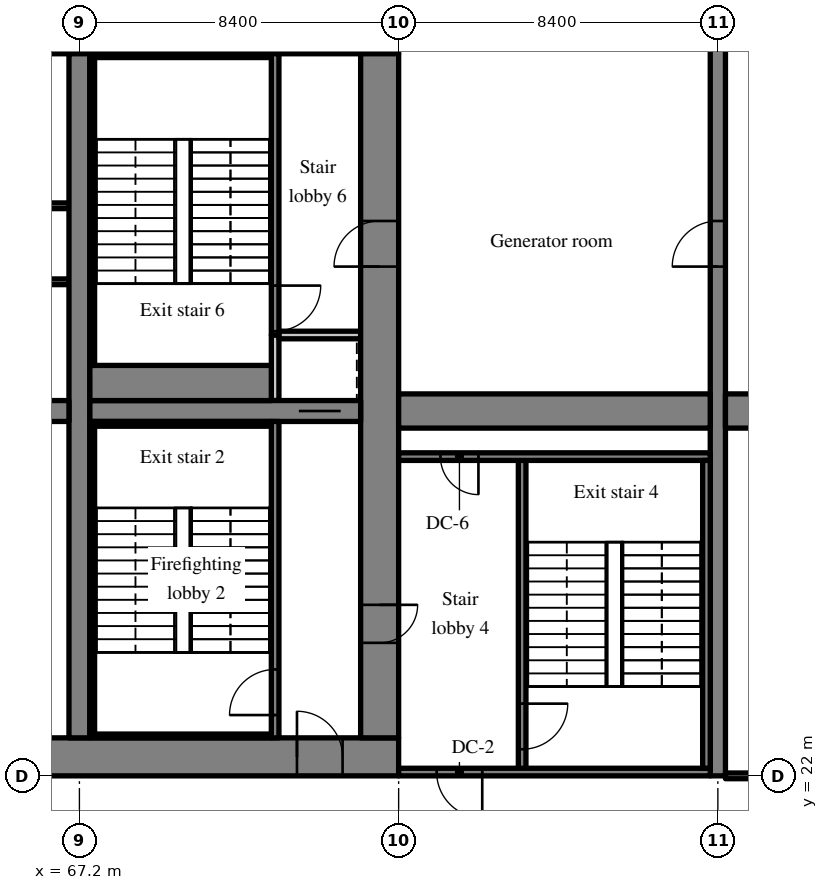
"""IFC4 building model, lengths in metres.
Left out: names, types, materials, properties, quantities, classifications, styles, units other than length and angle.
Written with IfcOpenShell. Run it as: python <this file> out.ifc"""

import sys

from ifc_helpers import new_model, si_unit, direction, frame, frame_2d, origin, place, context, subcontext, project, spatial, rectangle, extrude, source, transform, mapped, element, fill, save


model = new_model("IFC4")
c1 = context("Model", 3, precision=1e-05, world=origin(), true_north=direction((0.0, 1.0)))
c2 = subcontext(c1, "Body", "Model", "MODEL_VIEW")
j1 = project(units=[si_unit("LENGTHUNIT", "METRE"), si_unit("PLANEANGLEUNIT", "RADIAN")], contexts=[c1])
p1 = place(None, origin())
s1 = spatial("IfcSite", under=j1, at=p1, CompositionType="ELEMENT")
p2 = place(p1, origin())
s2 = spatial("IfcBuilding", under=s1, at=p2, CompositionType="ELEMENT")
p3 = place(p2, frame((0.0, 0.0, 81.0)))
s3 = spatial("IfcBuildingStorey", under=s2, at=p3, CompositionType="ELEMENT", Elevation=81.0)
m1 = source(origin(), c2, "Body", "SweptSolid", [
    extrude(rectangle(XDim=50.4, YDim=1.0, at=frame_2d((25.2, 0.0))), origin(), (0.0, 0.0, 1.0), 5.12),
])
p4 = place(p3, frame((25.2, 22.5, 0.0), z_axis=(0.0, 0.0, 1.0), x_axis=(1.0, 0.0, 0.0)))
e1 = element("IfcWall", 1, at=p4, inside=s3, PredefinedType="SHEAR", context=c2, shape_type="MappedRepresentation", body=[
    mapped(m1, transform((0.0, 0.0, 0.0), scale=1.0)),
])
m2 = source(origin(), c2, "Body", "SweptSolid", [
    extrude(rectangle(XDim=1.8, YDim=2.1, at=frame_2d((0.9, 1.05))), frame((0.0, 0.51, 0.0), z_axis=(0.0, -1.0, 0.0), x_axis=(1.0, 0.0, 0.0)), (0.0, 0.0, 1.0), 1.02),
])
p5 = place(p4, frame((15.9, 0.0, 0.0)))
e2 = element("IfcOpeningElement", 2, at=p5, cuts=e1, PredefinedType="OPENING", context=c2, shape_type="MappedRepresentation", body=[
    mapped(m2, transform((0.0, 0.0, 0.0), scale=1.0)),
])
m3 = source(origin(), c2, "Body", "SweptSolid", [
    extrude(rectangle(XDim=1.2, YDim=2.1, at=frame_2d((0.6, 1.05))), frame((0.0, 0.51, 0.0), z_axis=(0.0, -1.0, 0.0), x_axis=(1.0, 0.0, 0.0)), (0.0, 0.0, 1.0), 1.02),
])
p6 = place(p4, frame((26.987, 0.0, 0.0)))
e3 = element("IfcOpeningElement", 3, at=p6, cuts=e1, PredefinedType="OPENING", context=c2, shape_type="MappedRepresentation", body=[
    mapped(m3, transform((0.0, 0.0, 0.0), scale=1.0)),
])
m4 = source(origin(), c2, "Body", "SweptSolid", [
    extrude(rectangle(XDim=0.9, YDim=2.1, at=frame_2d((0.45, 1.05))), frame((0.0, 0.51, 0.0), z_axis=(0.0, -1.0, 0.0), x_axis=(1.0, 0.0, 0.0)), (0.0, 0.0, 1.0), 1.02),
])
p7 = place(p4, frame((33.75, 0.0, 0.0)))
e4 = element("IfcOpeningElement", 4, at=p7, cuts=e1, PredefinedType="OPENING", context=c2, shape_type="MappedRepresentation", body=[
    mapped(m4, transform((0.0, 0.0, 0.0), scale=1.0)),
])
p8 = place(p4, frame((30.75, 0.0, 0.0)))
e5 = element("IfcOpeningElement", 5, at=p8, cuts=e1, PredefinedType="OPENING", context=c2, shape_type="MappedRepresentation", body=[
    mapped(m4, transform((0.0, 0.0, 0.0), scale=1.0)),
])
p9 = place(p4, frame((38.262, 0.0, 0.0)))
e6 = element("IfcOpeningElement", 6, at=p9, cuts=e1, PredefinedType="OPENING", context=c2, shape_type="MappedRepresentation", body=[
    mapped(m4, transform((0.0, 0.0, 0.0), scale=1.0)),
])
p10 = place(p4, frame((6.438, 0.0, 0.0)))
e7 = element("IfcOpeningElement", 7, at=p10, cuts=e1, PredefinedType="OPENING", context=c2, shape_type="MappedRepresentation", body=[
    mapped(m3, transform((0.0, 0.0, 0.0), scale=1.0)),
])
p11 = place(p4, frame((47.725, 0.0, 0.0)))
e8 = element("IfcOpeningElement", 8, at=p11, cuts=e1, PredefinedType="OPENING", context=c2, shape_type="MappedRepresentation", body=[
    mapped(m3, transform((0.0, 0.0, 0.0), scale=1.0)),
])
p12 = place(p3, frame((25.2, 41.5, 0.0), z_axis=(0.0, 0.0, 1.0), x_axis=(1.0, 0.0, 0.0)))
e9 = element("IfcWall", 9, at=p12, inside=s3, PredefinedType="SHEAR", context=c2, shape_type="MappedRepresentation", body=[
    mapped(m1, transform((0.0, 0.0, 0.0), scale=1.0)),
])
m5 = source(origin(), c2, "Body", "SweptSolid", [
    extrude(rectangle(XDim=18.0, YDim=1.0, at=frame_2d((9.0, 0.0))), origin(), (0.0, 0.0, 1.0), 5.12),
])
p13 = place(p3, frame((75.1, 23.0, 0.0), z_axis=(0.0, 0.0, 1.0), x_axis=(0.0, 1.0, 0.0)))
e10 = element("IfcWall", 10, at=p13, inside=s3, PredefinedType="SHEAR", context=c2, shape_type="MappedRepresentation", body=[
    mapped(m5, transform((0.0, 0.0, 0.0), scale=1.0)),
])
m6 = source(origin(), c2, "Body", "SweptSolid", [
    extrude(rectangle(XDim=1.0, YDim=2.1, at=frame_2d((0.5, 1.05))), frame((0.0, 0.51, 0.0), z_axis=(0.0, -1.0, 0.0), x_axis=(1.0, 0.0, 0.0)), (0.0, 0.0, 1.0), 1.02),
])
p14 = place(p13, frame((2.5, 0.0, 0.0)))
e11 = element("IfcOpeningElement", 11, at=p14, cuts=e10, PredefinedType="OPENING", context=c2, shape_type="MappedRepresentation", body=[
    mapped(m6, transform((0.0, 0.0, 0.0), scale=1.0)),
])
p15 = place(p13, frame((12.4, 0.0, 0.0)))
e12 = element("IfcOpeningElement", 12, at=p15, cuts=e10, PredefinedType="OPENING", context=c2, shape_type="MappedRepresentation", body=[
    mapped(m3, transform((0.0, 0.0, 0.0), scale=1.0)),
])
m7 = source(origin(), c2, "Body", "SweptSolid", [
    extrude(rectangle(XDim=18.0, YDim=0.55, at=frame_2d((9.0, 0.0))), origin(), (0.0, 0.0, 1.0), 5.12),
])
p16 = place(p3, frame((67.2, 23.0, 0.0), z_axis=(0.0, 0.0, 1.0), x_axis=(0.0, 1.0, 0.0)))
e13 = element("IfcWall", 13, at=p16, inside=s3, PredefinedType="SHEAR", context=c2, shape_type="MappedRepresentation", body=[
    mapped(m7, transform((0.0, 0.0, 0.0), scale=1.0)),
])
m8 = source(origin(), c2, "Body", "SweptSolid", [
    extrude(rectangle(XDim=16.25, YDim=0.55, at=frame_2d((8.125, 0.0))), origin(), (0.0, 0.0, 1.0), 5.12),
])
p17 = place(p3, frame((50.675, 31.6, 0.0), z_axis=(0.0, 0.0, 1.0), x_axis=(1.0, 0.0, 0.0)))
e14 = element("IfcWall", 14, at=p17, inside=s3, PredefinedType="SHEAR", context=c2, shape_type="MappedRepresentation", body=[
    mapped(m8, transform((0.0, 0.0, 0.0), scale=1.0)),
])
m9 = source(origin(), c2, "Body", "SweptSolid", [
    extrude(rectangle(XDim=1.0, YDim=2.1, at=frame_2d((0.5, 1.05))), frame((0.0, 0.285, 0.0), z_axis=(0.0, -1.0, 0.0), x_axis=(1.0, 0.0, 0.0)), (0.0, 0.0, 1.0), 0.57),
])
p18 = place(p17, frame((0.562, 0.0, 0.0)))
e15 = element("IfcOpeningElement", 15, at=p18, cuts=e14, PredefinedType="OPENING", context=c2, shape_type="MappedRepresentation", body=[
    mapped(m9, transform((0.0, 0.0, 0.0), scale=1.0)),
])
m10 = source(origin(), c2, "Body", "SweptSolid", [
    extrude(rectangle(XDim=7.125, YDim=0.55, at=frame_2d((3.562, 0.0))), origin(), (0.0, 0.0, 1.0), 5.12),
])
p19 = place(p3, frame((67.475, 31.6, 0.0), z_axis=(0.0, 0.0, 1.0), x_axis=(1.0, 0.0, 0.0)))
e16 = element("IfcWall", 16, at=p19, inside=s3, PredefinedType="SHEAR", context=c2, shape_type="MappedRepresentation", body=[
    mapped(m10, transform((0.0, 0.0, 0.0), scale=1.0)),
])
m11 = source(origin(), c2, "Body", "SweptSolid", [
    extrude(rectangle(XDim=1.1, YDim=2.1, at=frame_2d((0.55, 1.05))), frame((0.0, 0.285, 0.0), z_axis=(0.0, -1.0, 0.0), x_axis=(1.0, 0.0, 0.0)), (0.0, 0.0, 1.0), 0.57),
])
p20 = place(p19, frame((5.5, 0.0, 0.0)))
e17 = element("IfcOpeningElement", 17, at=p20, cuts=e16, PredefinedType="OPENING", context=c2, shape_type="MappedRepresentation", body=[
    mapped(m11, transform((0.0, 0.0, 0.0), scale=1.0)),
])
m12 = source(origin(), c2, "Body", "SweptSolid", [
    extrude(rectangle(XDim=20.0, YDim=0.4, at=frame_2d((10.0, 0.0))), origin(), (0.0, 0.0, 1.0), 5.12),
])
p21 = place(p3, frame((84.0, 22.0, 0.0), z_axis=(0.0, 0.0, 1.0), x_axis=(0.0, 1.0, 0.0)))
e18 = element("IfcWall", 18, at=p21, inside=s3, PredefinedType="SHEAR", context=c2, shape_type="MappedRepresentation", body=[
    mapped(m12, transform((0.0, 0.0, 0.0), scale=1.0)),
])
m13 = source(origin(), c2, "Body", "SweptSolid", [
    extrude(rectangle(XDim=1.2, YDim=2.1, at=frame_2d((0.6, 1.05))), frame((0.0, 0.21, 0.0), z_axis=(0.0, -1.0, 0.0), x_axis=(1.0, 0.0, 0.0)), (0.0, 0.0, 1.0), 0.42),
])
p22 = place(p21, frame((13.4, 0.0, 0.0)))
e19 = element("IfcOpeningElement", 19, at=p22, cuts=e18, PredefinedType="OPENING", context=c2, shape_type="MappedRepresentation", body=[
    mapped(m13, transform((0.0, 0.0, 0.0), scale=1.0)),
])
m14 = source(origin(), c2, "Body", "SweptSolid", [
    extrude(rectangle(XDim=8.2, YDim=0.9, at=frame_2d((4.1, 0.0))), origin(), (0.0, 0.0, 1.0), 5.12),
])
p23 = place(p3, frame((75.6, 31.6, 0.0), z_axis=(0.0, 0.0, 1.0), x_axis=(1.0, 0.0, 0.0)))
e20 = element("IfcWall", 20, at=p23, inside=s3, PredefinedType="SHEAR", context=c2, shape_type="MappedRepresentation", body=[
    mapped(m14, transform((0.0, 0.0, 0.0), scale=1.0)),
])
m15 = source(origin(), c2, "Body", "SweptSolid", [
    extrude(rectangle(XDim=8.0, YDim=0.9, at=frame_2d((4.0, 0.0))), origin(), (0.0, 0.0, 1.0), 5.12),
])
p24 = place(p3, frame((84.2, 31.6, 0.0), z_axis=(0.0, 0.0, 1.0), x_axis=(1.0, 0.0, 0.0)))
e21 = element("IfcWall", 21, at=p24, inside=s3, PredefinedType="SHEAR", context=c2, shape_type="MappedRepresentation", body=[
    mapped(m15, transform((0.0, 0.0, 0.0), scale=1.0)),
])
m16 = source(origin(), c2, "Body", "SweptSolid", [
    extrude(rectangle(XDim=14.125, YDim=0.15, at=frame_2d((7.062, 0.0))), origin(), (0.0, 0.0, 1.0), 5.12),
])
p25 = place(p3, frame((66.925, 35.0, 0.0), z_axis=(0.0, 0.0, 1.0), x_axis=(-1.0, 0.0, 0.0)))
e22 = element("IfcWall", 22, at=p25, inside=s3, PredefinedType="PARTITIONING", context=c2, shape_type="MappedRepresentation", body=[
    mapped(m16, transform((0.0, 0.0, 0.0), scale=1.0)),
])
m17 = source(origin(), c2, "Body", "SweptSolid", [
    extrude(rectangle(XDim=0.9, YDim=2.1, at=frame_2d((0.45, 1.05))), frame((0.0, 0.085, 0.0), z_axis=(0.0, -1.0, 0.0), x_axis=(1.0, 0.0, 0.0)), (0.0, 0.0, 1.0), 0.17),
])
p26 = place(p25, frame((3.414, 0.0, 0.0)))
e23 = element("IfcOpeningElement", 23, at=p26, cuts=e22, PredefinedType="OPENING", context=c2, shape_type="MappedRepresentation", body=[
    mapped(m17, transform((0.0, 0.0, 0.0), scale=1.0)),
])
p27 = place(p25, frame((10.439, 0.0, 0.0)))
e24 = element("IfcOpeningElement", 24, at=p27, cuts=e22, PredefinedType="OPENING", context=c2, shape_type="MappedRepresentation", body=[
    mapped(m17, transform((0.0, 0.0, 0.0), scale=1.0)),
])
m18 = source(origin(), c2, "Body", "SweptSolid", [
    extrude(rectangle(XDim=16.25, YDim=0.15, at=frame_2d((8.125, 0.0))), origin(), (0.0, 0.0, 1.0), 5.12),
])
p28 = place(p3, frame((66.925, 37.0, 0.0), z_axis=(0.0, 0.0, 1.0), x_axis=(-1.0, 0.0, 0.0)))
e25 = element("IfcWall", 25, at=p28, inside=s3, PredefinedType="PARTITIONING", context=c2, shape_type="MappedRepresentation", body=[
    mapped(m18, transform((0.0, 0.0, 0.0), scale=1.0)),
])
p29 = place(p28, frame((6.456, 0.0, 0.0)))
e26 = element("IfcOpeningElement", 26, at=p29, cuts=e25, PredefinedType="OPENING", context=c2, shape_type="MappedRepresentation", body=[
    mapped(m17, transform((0.0, 0.0, 0.0), scale=1.0)),
])
p30 = place(p28, frame((14.581, 0.0, 0.0)))
e27 = element("IfcOpeningElement", 27, at=p30, cuts=e25, PredefinedType="OPENING", context=c2, shape_type="MappedRepresentation", body=[
    mapped(m17, transform((0.0, 0.0, 0.0), scale=1.0)),
])
m19 = source(origin(), c2, "Body", "SweptSolid", [
    extrude(rectangle(XDim=8.325, YDim=0.2, at=frame_2d((4.163, 0.0))), origin(), (0.0, 0.0, 1.0), 5.12),
])
p31 = place(p3, frame((72.35, 23.0, 0.0), z_axis=(0.0, 0.0, 1.0), x_axis=(0.0, 1.0, 0.0)))
e28 = element("IfcWall", 28, at=p31, inside=s3, PredefinedType="SOLIDWALL", context=c2, shape_type="MappedRepresentation", body=[
    mapped(m19, transform((0.0, 0.0, 0.0), scale=1.0)),
])
m20 = source(origin(), c2, "Body", "SweptSolid", [
    extrude(rectangle(XDim=1.2, YDim=2.1, at=frame_2d((0.6, 1.05))), frame((0.0, 0.11, 0.0), z_axis=(0.0, -1.0, 0.0), x_axis=(1.0, 0.0, 0.0)), (0.0, 0.0, 1.0), 0.22),
])
p32 = place(p31, frame((0.6, 0.0, 0.0)))
e29 = element("IfcOpeningElement", 29, at=p32, cuts=e28, PredefinedType="OPENING", context=c2, shape_type="MappedRepresentation", body=[
    mapped(m20, transform((0.0, 0.0, 0.0), scale=1.0)),
])
m21 = source(origin(), c2, "Body", "SweptSolid", [
    extrude(rectangle(XDim=1.725, YDim=0.2, at=frame_2d((0.863, 0.0))), origin(), (0.0, 0.0, 1.0), 5.12),
])
p33 = place(p3, frame((72.35, 31.875, 0.0), z_axis=(0.0, 0.0, 1.0), x_axis=(0.0, 1.0, 0.0)))
e30 = element("IfcWall", 30, at=p33, inside=s3, PredefinedType="SOLIDWALL", context=c2, shape_type="MappedRepresentation", body=[
    mapped(m21, transform((0.0, 0.0, 0.0), scale=1.0)),
])
m22 = source(origin(), c2, "Body", "SweptSolid", [
    extrude(rectangle(XDim=2.15, YDim=0.2, at=frame_2d((1.075, 0.0))), origin(), (0.0, 0.0, 1.0), 5.12),
])
p34 = place(p3, frame((72.45, 33.6, 0.0), z_axis=(0.0, 0.0, 1.0), x_axis=(1.0, 0.0, 0.0)))
e31 = element("IfcWall", 31, at=p34, inside=s3, PredefinedType="SOLIDWALL", context=c2, shape_type="MappedRepresentation", body=[
    mapped(m22, transform((0.0, 0.0, 0.0), scale=1.0)),
])
m23 = source(origin(), c2, "Body", "SweptSolid", [
    extrude(rectangle(XDim=7.4, YDim=0.2, at=frame_2d((3.7, 0.0))), origin(), (0.0, 0.0, 1.0), 5.12),
])
p35 = place(p3, frame((72.35, 33.6, 0.0), z_axis=(0.0, 0.0, 1.0), x_axis=(0.0, 1.0, 0.0)))
e32 = element("IfcWall", 32, at=p35, inside=s3, PredefinedType="SOLIDWALL", context=c2, shape_type="MappedRepresentation", body=[
    mapped(m23, transform((0.0, 0.0, 0.0), scale=1.0)),
])
p36 = place(p35, frame((0.1, 0.0, 0.0)))
e33 = element("IfcOpeningElement", 33, at=p36, cuts=e32, PredefinedType="OPENING", context=c2, shape_type="MappedRepresentation", body=[
    mapped(m20, transform((0.0, 0.0, 0.0), scale=1.0)),
])
m24 = source(origin(), c2, "Body", "SweptSolid", [
    extrude(rectangle(XDim=8.3, YDim=0.2, at=frame_2d((4.15, 0.0))), origin(), (0.0, 0.0, 1.0), 5.12),
])
p37 = place(p3, frame((78.85, 22.1, 0.0), z_axis=(0.0, 0.0, 1.0), x_axis=(0.0, 1.0, 0.0)))
e34 = element("IfcWall", 34, at=p37, inside=s3, PredefinedType="SOLIDWALL", context=c2, shape_type="MappedRepresentation", body=[
    mapped(m24, transform((0.0, 0.0, 0.0), scale=1.0)),
])
p38 = place(p37, frame((0.6, 0.0, 0.0)))
e35 = element("IfcOpeningElement", 35, at=p38, cuts=e34, PredefinedType="OPENING", context=c2, shape_type="MappedRepresentation", body=[
    mapped(m20, transform((0.0, 0.0, 0.0), scale=1.0)),
])
m25 = source(origin(), c2, "Body", "SweptSolid", [
    extrude(rectangle(XDim=8.2, YDim=0.2, at=frame_2d((4.1, 0.0))), origin(), (0.0, 0.0, 1.0), 5.12),
])
p39 = place(p3, frame((83.8, 22.1, 0.0), z_axis=(0.0, 0.0, 1.0), x_axis=(-1.0, 0.0, 0.0)))
e36 = element("IfcWall", 36, at=p39, inside=s3, PredefinedType="SOLIDWALL", context=c2, shape_type="MappedRepresentation", body=[
    mapped(m25, transform((0.0, 0.0, 0.0), scale=1.0)),
])
p40 = place(p39, frame((6.0, 0.0, 0.0)))
e37 = element("IfcOpeningElement", 37, at=p40, cuts=e36, PredefinedType="OPENING", context=c2, shape_type="MappedRepresentation", body=[
    mapped(m20, transform((0.0, 0.0, 0.0), scale=1.0)),
])
p41 = place(p3, frame((83.8, 30.4, 0.0), z_axis=(0.0, 0.0, 1.0), x_axis=(-1.0, 0.0, 0.0)))
e38 = element("IfcWall", 38, at=p41, inside=s3, PredefinedType="SOLIDWALL", context=c2, shape_type="MappedRepresentation", body=[
    mapped(m25, transform((0.0, 0.0, 0.0), scale=1.0)),
])
m26 = source(origin(), c2, "Body", "SweptSolid", [
    extrude(rectangle(XDim=1.0, YDim=2.1, at=frame_2d((0.5, 1.05))), frame((0.0, 0.11, 0.0), z_axis=(0.0, -1.0, 0.0), x_axis=(1.0, 0.0, 0.0)), (0.0, 0.0, 1.0), 0.22),
])
p42 = place(p41, frame((6.1, 0.0, 0.0)))
e39 = element("IfcOpeningElement", 39, at=p42, cuts=e38, PredefinedType="OPENING", context=c2, shape_type="MappedRepresentation", body=[
    mapped(m26, transform((0.0, 0.0, 0.0), scale=1.0)),
])
m27 = source(origin(), c2, "Body", "SweptSolid", [
    extrude(rectangle(XDim=4.775, YDim=0.1, at=frame_2d((2.387, 0.0))), origin(), (0.0, 0.0, 1.0), 5.12),
])
p43 = place(p3, frame((67.475, 23.05, 0.0), z_axis=(0.0, 0.0, 1.0), x_axis=(1.0, 0.0, 0.0)))
e40 = element("IfcWall", 40, at=p43, inside=s3, PredefinedType="SOLIDWALL", context=c2, shape_type="MappedRepresentation", body=[
    mapped(m27, transform((0.0, 0.0, 0.0), scale=1.0)),
])
m28 = source(origin(), c2, "Body", "SweptSolid", [
    extrude(rectangle(XDim=4.775, YDim=0.125, at=frame_2d((2.387, 0.0))), origin(), (0.0, 0.0, 1.0), 5.12),
])
p44 = place(p3, frame((67.475, 31.262, 0.0), z_axis=(0.0, 0.0, 1.0), x_axis=(1.0, 0.0, 0.0)))
e41 = element("IfcWall", 41, at=p44, inside=s3, PredefinedType="SOLIDWALL", context=c2, shape_type="MappedRepresentation", body=[
    mapped(m28, transform((0.0, 0.0, 0.0), scale=1.0)),
])
m29 = source(origin(), c2, "Body", "SweptSolid", [
    extrude(rectangle(XDim=8.1, YDim=0.125, at=frame_2d((4.05, 0.0))), origin(), (0.0, 0.0, 1.0), 5.12),
])
p45 = place(p3, frame((67.537, 23.1, 0.0), z_axis=(0.0, 0.0, 1.0), x_axis=(0.0, 1.0, 0.0)))
e42 = element("IfcWall", 42, at=p45, inside=s3, PredefinedType="SOLIDWALL", context=c2, shape_type="MappedRepresentation", body=[
    mapped(m29, transform((0.0, 0.0, 0.0), scale=1.0)),
])
p46 = place(p3, frame((67.475, 40.95, 0.0), z_axis=(0.0, 0.0, 1.0), x_axis=(1.0, 0.0, 0.0)))
e43 = element("IfcWall", 43, at=p46, inside=s3, PredefinedType="SOLIDWALL", context=c2, shape_type="MappedRepresentation", body=[
    mapped(m27, transform((0.0, 0.0, 0.0), scale=1.0)),
])
m30 = source(origin(), c2, "Body", "SweptSolid", [
    extrude(rectangle(XDim=4.775, YDim=0.925, at=frame_2d((2.387, 0.0))), origin(), (0.0, 0.0, 1.0), 5.12),
])
p47 = place(p3, frame((67.475, 32.337, 0.0), z_axis=(0.0, 0.0, 1.0), x_axis=(1.0, 0.0, 0.0)))
e44 = element("IfcWall", 44, at=p47, inside=s3, PredefinedType="SOLIDWALL", context=c2, shape_type="MappedRepresentation", body=[
    mapped(m30, transform((0.0, 0.0, 0.0), scale=1.0)),
])
p48 = place(p3, frame((67.537, 32.8, 0.0), z_axis=(0.0, 0.0, 1.0), x_axis=(0.0, 1.0, 0.0)))
e45 = element("IfcWall", 45, at=p48, inside=s3, PredefinedType="SOLIDWALL", context=c2, shape_type="MappedRepresentation", body=[
    mapped(m29, transform((0.0, 0.0, 0.0), scale=1.0)),
])
m31 = source(origin(), c2, "Body", "SweptSolid", [
    extrude(rectangle(XDim=8.1, YDim=0.2, at=frame_2d((4.05, 0.0))), origin(), (0.0, 0.0, 1.0), 5.12),
])
p49 = place(p3, frame((83.7, 22.2, 0.0), z_axis=(0.0, 0.0, 1.0), x_axis=(0.0, 1.0, 0.0)))
e46 = element("IfcWall", 46, at=p49, inside=s3, PredefinedType="SOLIDWALL", context=c2, shape_type="MappedRepresentation", body=[
    mapped(m31, transform((0.0, 0.0, 0.0), scale=1.0)),
])
m32 = source(origin(), c2, "Body", "SweptSolid", [
    extrude(rectangle(XDim=8.0, YDim=0.15, at=frame_2d((4.0, 0.0))), origin(), (0.0, 0.0, 1.0), 4.37),
])
p50 = place(p3, frame((84.2, 22.0, 0.0), z_axis=(0.0, 0.0, 1.0), x_axis=(1.0, 0.0, 0.0)))
e47 = element("IfcWall", 47, at=p50, inside=s3, PredefinedType="PARTITIONING", context=c2, shape_type="MappedRepresentation", body=[
    mapped(m32, transform((0.0, 0.0, 0.0), scale=1.0)),
])
m33 = source(origin(), c2, "Body", "SweptSolid", [
    extrude(rectangle(XDim=1.2, YDim=2.1, at=frame_2d((0.6, 1.05))), frame((0.0, 0.085, 0.0), z_axis=(0.0, -1.0, 0.0), x_axis=(1.0, 0.0, 0.0)), (0.0, 0.0, 1.0), 0.17),
])
p51 = place(p50, frame((3.4, 0.0, 0.0)))
e48 = element("IfcOpeningElement", 48, at=p51, cuts=e47, PredefinedType="OPENING", context=c2, shape_type="MappedRepresentation", body=[
    mapped(m33, transform((0.0, 0.0, 0.0), scale=1.0)),
])
m34 = source(origin(), c2, "Body", "SweptSolid", [
    extrude(rectangle(XDim=1.2, YDim=2.1, at=frame_2d((0.6, 1.05))), frame((0.0, 0.025, 0.0), z_axis=(0.0, -1.0, 0.0), x_axis=(1.0, 0.0, 0.0)), (0.0, 0.0, 1.0), 0.05),
])
p52 = place(p32, origin())
e49 = element("IfcDoor", 49, at=p52, inside=s3, OperationType="SINGLE_SWING_LEFT", PredefinedType="DOOR", context=c2, shape_type="MappedRepresentation", body=[
    mapped(m34, transform((0.0, 0.0, 0.0), scale=1.0)),
])
fill(e29, e49)
m35 = source(origin(), c2, "Body", "SweptSolid", [
    extrude(rectangle(XDim=1.2, YDim=2.1, at=frame_2d((0.6, 1.05))), frame((0.0, 0.375, 0.0), z_axis=(0.0, -1.0, 0.0), x_axis=(1.0, 0.0, 0.0)), (0.0, 0.0, 1.0), 0.05),
])
p53 = place(p11, origin())
e50 = element("IfcDoor", 50, at=p53, inside=s3, OperationType="SINGLE_SWING_LEFT", PredefinedType="DOOR", context=c2, shape_type="MappedRepresentation", body=[
    mapped(m35, transform((0.0, 0.0, 0.0), scale=1.0)),
])
fill(e8, e50)
m36 = source(origin(), c2, "Body", "SweptSolid", [
    extrude(rectangle(XDim=1.1, YDim=2.1, at=frame_2d((0.55, 1.05))), frame((0.0, 0.025, 0.0), z_axis=(0.0, -1.0, 0.0), x_axis=(1.0, 0.0, 0.0)), (0.0, 0.0, 1.0), 0.05),
])
p54 = place(p20, origin())
e51 = element("IfcDoor", 51, at=p54, inside=s3, OperationType="SLIDING_TO_LEFT", PredefinedType="DOOR", context=c2, shape_type="MappedRepresentation", body=[
    mapped(m36, transform((0.0, 0.0, 0.0), scale=1.0)),
])
fill(e17, e51)
m37 = source(origin(), c2, "Body", "SweptSolid", [
    extrude(rectangle(XDim=1.0, YDim=2.1, at=frame_2d((0.5, 1.05))), frame((0.0, 0.025, 0.0), z_axis=(0.0, -1.0, 0.0), x_axis=(1.0, 0.0, 0.0)), (0.0, 0.0, 1.0), 0.05),
])
p55 = place(p14, origin())
e52 = element("IfcDoor", 52, at=p55, inside=s3, OperationType="SINGLE_SWING_RIGHT", PredefinedType="DOOR", context=c2, shape_type="MappedRepresentation", body=[
    mapped(m37, transform((0.0, 0.0, 0.0), scale=1.0)),
])
fill(e11, e52)
p56 = place(p36, origin())
e53 = element("IfcDoor", 53, at=p56, inside=s3, OperationType="SINGLE_SWING_RIGHT", PredefinedType="DOOR", context=c2, shape_type="MappedRepresentation", body=[
    mapped(m34, transform((0.0, 0.0, 0.0), scale=1.0)),
])
fill(e33, e53)
p57 = place(p38, origin())
e54 = element("IfcDoor", 54, at=p57, inside=s3, OperationType="SINGLE_SWING_RIGHT", PredefinedType="DOOR", context=c2, shape_type="MappedRepresentation", body=[
    mapped(m34, transform((0.0, 0.0, 0.0), scale=1.0)),
])
fill(e35, e54)
p58 = place(p40, origin())
e55 = element("IfcDoor", 55, at=p58, inside=s3, OperationType="SINGLE_SWING_LEFT", PredefinedType="DOOR", context=c2, shape_type="MappedRepresentation", body=[
    mapped(m34, transform((0.0, 0.0, 0.0), scale=1.0)),
])
fill(e37, e55)
p59 = place(p42, origin())
e56 = element("IfcDoor", 56, at=p59, inside=s3, OperationType="SINGLE_SWING_LEFT", PredefinedType="DOOR", context=c2, shape_type="MappedRepresentation", body=[
    mapped(m37, transform((0.0, 0.0, 0.0), scale=1.0)),
])
fill(e39, e56)
p60 = place(p15, origin())
e57 = element("IfcDoor", 57, at=p60, inside=s3, OperationType="SINGLE_SWING_LEFT", PredefinedType="DOOR", context=c2, shape_type="MappedRepresentation", body=[
    mapped(m34, transform((0.0, 0.0, 0.0), scale=1.0)),
])
fill(e12, e57)
p61 = place(p22, origin())
e58 = element("IfcDoor", 58, at=p61, inside=s3, OperationType="SINGLE_SWING_LEFT", PredefinedType="DOOR", context=c2, shape_type="MappedRepresentation", body=[
    mapped(m34, transform((0.0, 0.0, 0.0), scale=1.0)),
])
fill(e19, e58)
save(model, sys.argv[1])
